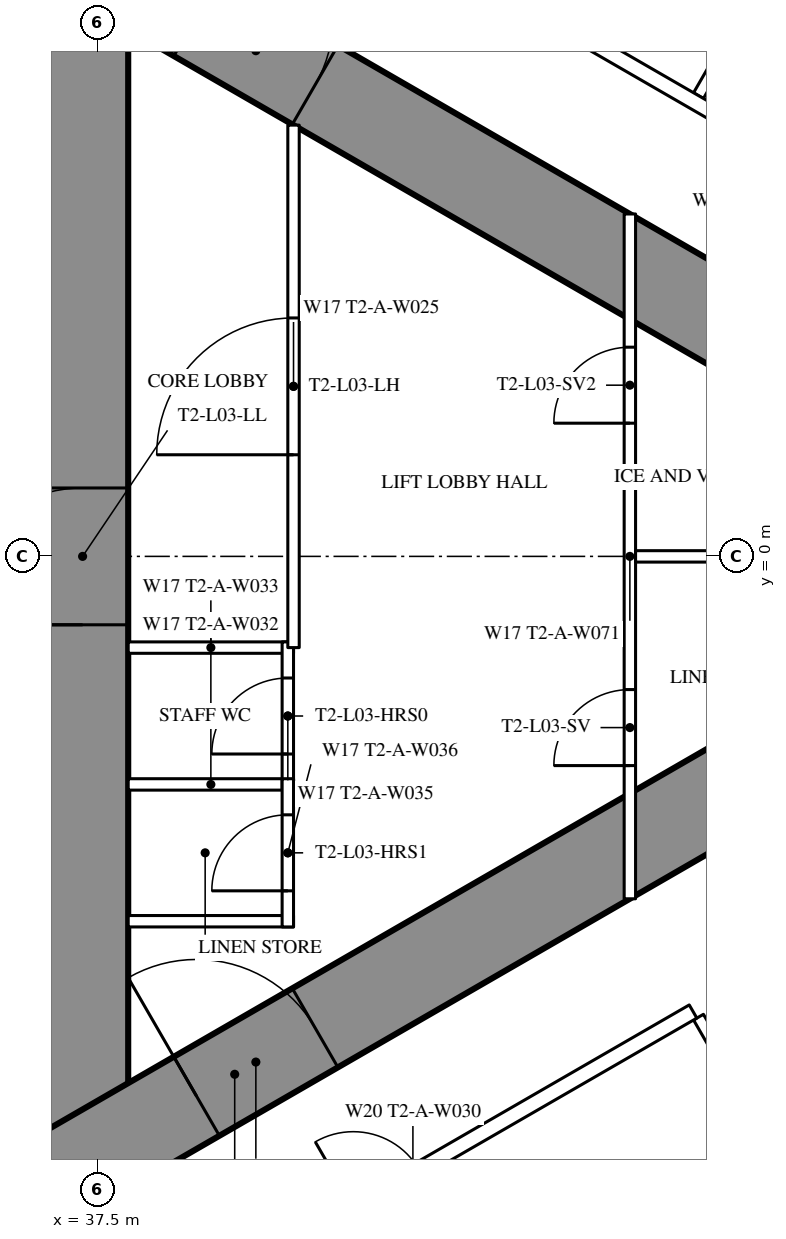
"""IFC4 building model, lengths in metres.
Left out: names, types, materials, properties, quantities, classifications, styles, units other than length and angle.
Written with IfcOpenShell. Run it as: python <this file> out.ifc"""

import sys

from ifc_helpers import new_model, si_unit, direction, frame, frame_2d, origin, place, context, subcontext, project, spatial, rectangle, extrude, element, fill, save


model = new_model("IFC4")
c1 = context("Model", 3, precision=1e-05, world=origin(), true_north=direction((0.0, 1.0)))
c2 = subcontext(c1, "Body", "Model", "MODEL_VIEW")
j1 = project(units=[si_unit("LENGTHUNIT", "METRE"), si_unit("PLANEANGLEUNIT", "RADIAN")], contexts=[c1])
p1 = place(None, origin())
s1 = spatial("IfcSite", under=j1, at=p1, CompositionType="ELEMENT")
p2 = place(p1, origin())
s2 = spatial("IfcBuilding", under=s1, at=p2, CompositionType="ELEMENT")
p3 = place(p2, frame((0.0, 0.0, 18.0)))
s3 = spatial("IfcBuildingStorey", under=s2, at=p3, CompositionType="ELEMENT", Elevation=18.0)
p4 = place(p3, frame((37.3, -8.6, 0.0), z_axis=(0.0, 0.0, 1.0), x_axis=(0.0, 1.0, 0.0)))
e1 = element("IfcWall", 1, at=p4, inside=s3, PredefinedType="SHEAR", context=c2, shape_type="SweptSolid", body=[
    extrude(rectangle(XDim=17.2, YDim=1.2, at=frame_2d((8.6, 0.0))), origin(), (0.0, 0.0, 1.0), 3.5),
])
p5 = place(p4, frame((7.7, 0.0, 0.0)))
e2 = element("IfcOpeningElement", 2, at=p5, cuts=e1, PredefinedType="OPENING", context=c2, shape_type="SweptSolid", body=[
    extrude(rectangle(XDim=1.8, YDim=2.2, at=frame_2d((0.9, 1.1))), frame((0.0, 0.61, 0.0), z_axis=(0.0, -1.0, 0.0), x_axis=(1.0, 0.0, 0.0)), (0.0, 0.0, 1.0), 1.22),
])
p6 = place(p3, frame((27.2, -13.8, 0.0), z_axis=(0.0, 0.0, 1.0), x_axis=(0.866027159892, 0.499996958321, 0.0)))
e3 = element("IfcWall", 3, at=p6, inside=s3, PredefinedType="SHEAR", context=c2, shape_type="SweptSolid", body=[
    extrude(rectangle(XDim=27.947, YDim=1.2, at=frame_2d((13.973, 0.0))), origin(), (0.0, 0.0, 1.0), 3.5),
])
p7 = place(p6, frame((4.6, 0.0, 0.0)))
e4 = element("IfcOpeningElement", 4, at=p7, cuts=e3, PredefinedType="OPENING", context=c2, shape_type="SweptSolid", body=[
    extrude(rectangle(XDim=1.0, YDim=2.2, at=frame_2d((0.5, 1.1))), frame((0.0, 0.61, 0.0), z_axis=(0.0, -1.0, 0.0), x_axis=(1.0, 0.0, 0.0)), (0.0, 0.0, 1.0), 1.22),
])
p8 = place(p6, frame((13.395, 0.0, 0.0)))
e5 = element("IfcOpeningElement", 5, at=p8, cuts=e3, PredefinedType="OPENING", context=c2, shape_type="SweptSolid", body=[
    extrude(rectangle(XDim=1.8, YDim=2.2, at=frame_2d((0.9, 1.1))), frame((0.0, 0.61, 0.0), z_axis=(0.0, -1.0, 0.0), x_axis=(1.0, 0.0, 0.0)), (0.0, 0.0, 1.0), 1.22),
])
p9 = place(p3, frame((27.2, 13.8, 0.0), z_axis=(0.0, 0.0, 1.0), x_axis=(0.866024515034, -0.500001539357, 0.0)))
e6 = element("IfcWall", 6, at=p9, inside=s3, PredefinedType="SHEAR", context=c2, shape_type="SweptSolid", body=[
    extrude(rectangle(XDim=26.907, YDim=1.2, at=frame_2d((13.454, 0.0))), origin(), (0.0, 0.0, 1.0), 3.5),
])
p10 = place(p9, frame((4.6, 0.0, 0.0)))
e7 = element("IfcOpeningElement", 7, at=p10, cuts=e6, PredefinedType="OPENING", context=c2, shape_type="SweptSolid", body=[
    extrude(rectangle(XDim=1.0, YDim=2.2, at=frame_2d((0.5, 1.1))), frame((0.0, 0.61, 0.0), z_axis=(0.0, -1.0, 0.0), x_axis=(1.0, 0.0, 0.0)), (0.0, 0.0, 1.0), 1.22),
])
p11 = place(p9, frame((13.395, 0.0, 0.0)))
e8 = element("IfcOpeningElement", 8, at=p11, cuts=e6, PredefinedType="OPENING", context=c2, shape_type="SweptSolid", body=[
    extrude(rectangle(XDim=1.8, YDim=2.2, at=frame_2d((0.9, 1.1))), frame((0.0, 0.61, 0.0), z_axis=(0.0, -1.0, 0.0), x_axis=(1.0, 0.0, 0.0)), (0.0, 0.0, 1.0), 1.22),
])
p12 = place(p3, frame((45.403, -6.062, 0.0), z_axis=(0.0, 0.0, 1.0), x_axis=(0.500007077968, -0.866021317279, 0.0)))
e9 = element("IfcWall", 9, at=p12, inside=s3, PredefinedType="PARTITIONING", context=c2, shape_type="SweptSolid", body=[
    extrude(rectangle(XDim=12.721, YDim=0.15, at=frame_2d((6.361, 0.0))), origin(), (0.0, 0.0, 1.0), 3.25),
])
p13 = place(p3, frame((45.403, 6.062, 0.0), z_axis=(0.0, 0.0, 1.0), x_axis=(0.500013434677, 0.866017647131, 0.0)))
e10 = element("IfcWall", 10, at=p13, inside=s3, PredefinedType="PARTITIONING", context=c2, shape_type="SweptSolid", body=[
    extrude(rectangle(XDim=9.902, YDim=0.15, at=frame_2d((4.951, 0.0))), origin(), (0.0, 0.0, 1.0), 2.25),
])
p14 = place(p3, frame((36.834, 10.894, 0.0), z_axis=(0.0, 0.0, 1.0), x_axis=(0.866028157229, -0.499995230863, 0.0)))
e11 = element("IfcWall", 11, at=p14, inside=s3, PredefinedType="PARTITIONING", context=c2, shape_type="SweptSolid", body=[
    extrude(rectangle(XDim=21.667, YDim=0.2, at=frame_2d((10.833, 0.0))), origin(), (0.0, 0.0, 1.0), 3.25),
])
p15 = place(p14, frame((18.885, 0.0, 0.0)))
e12 = element("IfcOpeningElement", 12, at=p15, cuts=e11, PredefinedType="OPENING", context=c2, shape_type="SweptSolid", body=[
    extrude(rectangle(XDim=0.95, YDim=2.2, at=frame_2d((0.475, 1.1))), frame((0.0, 0.11, 0.0), z_axis=(0.0, -1.0, 0.0), x_axis=(1.0, 0.0, 0.0)), (0.0, 0.0, 1.0), 0.22),
])
p16 = place(p14, frame((14.835, 0.0, 0.0)))
e13 = element("IfcOpeningElement", 13, at=p16, cuts=e11, PredefinedType="OPENING", context=c2, shape_type="SweptSolid", body=[
    extrude(rectangle(XDim=0.95, YDim=2.2, at=frame_2d((0.475, 1.1))), frame((0.0, 0.11, 0.0), z_axis=(0.0, -1.0, 0.0), x_axis=(1.0, 0.0, 0.0)), (0.0, 0.0, 1.0), 0.22),
])
p17 = place(p14, frame((12.85, 0.0, 0.0)))
e14 = element("IfcOpeningElement", 14, at=p17, cuts=e11, PredefinedType="OPENING", context=c2, shape_type="SweptSolid", body=[
    extrude(rectangle(XDim=0.95, YDim=2.2, at=frame_2d((0.475, 1.1))), frame((0.0, 0.11, 0.0), z_axis=(0.0, -1.0, 0.0), x_axis=(1.0, 0.0, 0.0)), (0.0, 0.0, 1.0), 0.22),
])
p18 = place(p14, frame((1.542, 0.0, 0.0)))
e15 = element("IfcOpeningElement", 15, at=p18, cuts=e11, PredefinedType="OPENING", context=c2, shape_type="SweptSolid", body=[
    extrude(rectangle(XDim=0.95, YDim=2.2, at=frame_2d((0.475, 1.1))), frame((0.0, 0.11, 0.0), z_axis=(0.0, -1.0, 0.0), x_axis=(1.0, 0.0, 0.0)), (0.0, 0.0, 1.0), 0.22),
])
p19 = place(p3, frame((37.96, -10.243, 0.0), z_axis=(0.0, 0.0, 1.0), x_axis=(0.866024617314, 0.500001362204, 0.0)))
e16 = element("IfcWall", 16, at=p19, inside=s3, PredefinedType="PARTITIONING", context=c2, shape_type="SweptSolid", body=[
    extrude(rectangle(XDim=8.512, YDim=0.2, at=frame_2d((4.256, 0.0))), origin(), (0.0, 0.0, 1.0), 3.25),
])
p20 = place(p19, frame((3.35, 0.0, 0.0)))
e17 = element("IfcOpeningElement", 17, at=p20, cuts=e16, PredefinedType="OPENING", context=c2, shape_type="SweptSolid", body=[
    extrude(rectangle(XDim=1.0, YDim=2.2, at=frame_2d((0.5, 1.1))), frame((0.0, 0.11, 0.0), z_axis=(0.0, -1.0, 0.0), x_axis=(1.0, 0.0, 0.0)), (0.0, 0.0, 1.0), 0.22),
])
for number, where, z_axis, x_axis in (
    (18, (37.9, -1.2, 0.0), (0.0, 0.0, 1.0), (1.0, 0.0, 0.0)),
    (19, (37.9, -3.0, 0.0), (0.0, 0.0, 1.0), (1.0, 0.0, 0.0)),
    (20, (37.9, -4.8, 0.0), (0.0, 0.0, 1.0), (1.0, 0.0, 0.0)),
):
    element("IfcWall", number, at=place(p3, frame(where, z_axis=z_axis, x_axis=x_axis)), inside=s3, PredefinedType="PARTITIONING", context=c2, shape_type="SweptSolid", body=[
        extrude(rectangle(XDim=2.175, YDim=0.15, at=frame_2d((1.087, 0.0))), origin(), (0.0, 0.0, 1.0), 3.25),
    ])
p21 = place(p3, frame((40.0, -3.075, 0.0), z_axis=(0.0, 0.0, 1.0), x_axis=(0.0, 1.0, 0.0)))
e21 = element("IfcWall", 21, at=p21, inside=s3, PredefinedType="PARTITIONING", context=c2, shape_type="SweptSolid", body=[
    extrude(rectangle(XDim=1.95, YDim=0.15, at=frame_2d((0.975, 0.0))), origin(), (0.0, 0.0, 1.0), 3.25),
])
p22 = place(p21, frame((0.475, 0.0, 0.0)))
e22 = element("IfcOpeningElement", 22, at=p22, cuts=e21, PredefinedType="OPENING", context=c2, shape_type="SweptSolid", body=[
    extrude(rectangle(XDim=1.0, YDim=2.2, at=frame_2d((0.5, 1.1))), frame((0.0, 0.085, 0.0), z_axis=(0.0, -1.0, 0.0), x_axis=(1.0, 0.0, 0.0)), (0.0, 0.0, 1.0), 0.17),
])
p23 = place(p3, frame((40.0, -4.875, 0.0), z_axis=(0.0, 0.0, 1.0), x_axis=(0.0, 1.0, 0.0)))
e23 = element("IfcWall", 23, at=p23, inside=s3, PredefinedType="PARTITIONING", context=c2, shape_type="SweptSolid", body=[
    extrude(rectangle(XDim=1.95, YDim=0.15, at=frame_2d((0.975, 0.0))), origin(), (0.0, 0.0, 1.0), 3.25),
])
p24 = place(p23, frame((0.475, 0.0, 0.0)))
e24 = element("IfcOpeningElement", 24, at=p24, cuts=e23, PredefinedType="OPENING", context=c2, shape_type="SweptSolid", body=[
    extrude(rectangle(XDim=1.0, YDim=2.2, at=frame_2d((0.5, 1.1))), frame((0.0, 0.085, 0.0), z_axis=(0.0, -1.0, 0.0), x_axis=(1.0, 0.0, 0.0)), (0.0, 0.0, 1.0), 0.17),
])
p25 = place(p3, frame((40.075, -1.2, 0.0), z_axis=(0.0, 0.0, 1.0), x_axis=(0.0, 1.0, 0.0)))
e25 = element("IfcWall", 25, at=p25, inside=s3, PredefinedType="PARTITIONING", context=c2, shape_type="SweptSolid", body=[
    extrude(rectangle(XDim=6.874, YDim=0.15, at=frame_2d((3.437, 0.0))), origin(), (0.0, 0.0, 1.0), 3.25),
])
p26 = place(p25, frame((2.537, 0.0, 0.0)))
e26 = element("IfcOpeningElement", 26, at=p26, cuts=e25, PredefinedType="OPENING", context=c2, shape_type="SweptSolid", body=[
    extrude(rectangle(XDim=1.8, YDim=2.2, at=frame_2d((0.9, 1.1))), frame((0.0, 0.085, 0.0), z_axis=(0.0, -1.0, 0.0), x_axis=(1.0, 0.0, 0.0)), (0.0, 0.0, 1.0), 0.17),
])
p27 = place(p3, frame((44.5, -4.505, 0.0), z_axis=(0.0, 0.0, 1.0), x_axis=(0.0, 1.0, 0.0)))
e27 = element("IfcWall", 27, at=p27, inside=s3, PredefinedType="PARTITIONING", context=c2, shape_type="SweptSolid", body=[
    extrude(rectangle(XDim=9.009, YDim=0.15, at=frame_2d((4.505, 0.0))), origin(), (0.0, 0.0, 1.0), 2.35),
])
p28 = place(p27, frame((1.752, 0.0, 0.0)))
e28 = element("IfcOpeningElement", 28, at=p28, cuts=e27, PredefinedType="OPENING", context=c2, shape_type="SweptSolid", body=[
    extrude(rectangle(XDim=1.0, YDim=2.2, at=frame_2d((0.5, 1.1))), frame((0.0, 0.085, 0.0), z_axis=(0.0, -1.0, 0.0), x_axis=(1.0, 0.0, 0.0)), (0.0, 0.0, 1.0), 0.17),
])
p29 = place(p27, frame((6.257, 0.0, 0.0)))
e29 = element("IfcOpeningElement", 29, at=p29, cuts=e27, PredefinedType="OPENING", context=c2, shape_type="SweptSolid", body=[
    extrude(rectangle(XDim=1.0, YDim=2.2, at=frame_2d((0.5, 1.1))), frame((0.0, 0.085, 0.0), z_axis=(0.0, -1.0, 0.0), x_axis=(1.0, 0.0, 0.0)), (0.0, 0.0, 1.0), 0.17),
])
p30 = place(p3, frame((44.575, 0.0, 0.0), z_axis=(0.0, 0.0, 1.0), x_axis=(1.0, 0.0, 0.0)))
e30 = element("IfcWall", 30, at=p30, inside=s3, PredefinedType="PARTITIONING", context=c2, shape_type="SweptSolid", body=[
    extrude(rectangle(XDim=7.727, YDim=0.15, at=frame_2d((3.864, 0.0))), origin(), (0.0, 0.0, 1.0), 2.25),
])
p31 = place(p22, origin())
e31 = element("IfcDoor", 31, at=p31, inside=s3, OperationType="SINGLE_SWING_LEFT", PredefinedType="DOOR", context=c2, shape_type="SweptSolid", body=[
    extrude(rectangle(XDim=1.0, YDim=2.2, at=frame_2d((0.5, 1.1))), frame((0.0, 0.025, 0.0), z_axis=(0.0, -1.0, 0.0), x_axis=(1.0, 0.0, 0.0)), (0.0, 0.0, 1.0), 0.05),
])
fill(e22, e31)
p32 = place(p24, origin())
e32 = element("IfcDoor", 32, at=p32, inside=s3, OperationType="SINGLE_SWING_LEFT", PredefinedType="DOOR", context=c2, shape_type="SweptSolid", body=[
    extrude(rectangle(XDim=1.0, YDim=2.2, at=frame_2d((0.5, 1.1))), frame((0.0, 0.025, 0.0), z_axis=(0.0, -1.0, 0.0), x_axis=(1.0, 0.0, 0.0)), (0.0, 0.0, 1.0), 0.05),
])
fill(e24, e32)
p33 = place(p26, origin())
e33 = element("IfcDoor", 33, at=p33, inside=s3, OperationType="DOUBLE_DOOR_SINGLE_SWING", PredefinedType="DOOR", context=c2, shape_type="SweptSolid", body=[
    extrude(rectangle(XDim=1.8, YDim=2.2, at=frame_2d((0.9, 1.1))), frame((0.0, 0.025, 0.0), z_axis=(0.0, -1.0, 0.0), x_axis=(1.0, 0.0, 0.0)), (0.0, 0.0, 1.0), 0.05),
])
fill(e26, e33)
p34 = place(p28, origin())
e34 = element("IfcDoor", 34, at=p34, inside=s3, OperationType="SINGLE_SWING_LEFT", PredefinedType="DOOR", context=c2, shape_type="SweptSolid", body=[
    extrude(rectangle(XDim=1.0, YDim=2.2, at=frame_2d((0.5, 1.1))), frame((0.0, 0.025, 0.0), z_axis=(0.0, -1.0, 0.0), x_axis=(1.0, 0.0, 0.0)), (0.0, 0.0, 1.0), 0.05),
])
fill(e28, e34)
p35 = place(p29, origin())
e35 = element("IfcDoor", 35, at=p35, inside=s3, OperationType="SINGLE_SWING_LEFT", PredefinedType="DOOR", context=c2, shape_type="SweptSolid", body=[
    extrude(rectangle(XDim=1.0, YDim=2.2, at=frame_2d((0.5, 1.1))), frame((0.0, 0.025, 0.0), z_axis=(0.0, -1.0, 0.0), x_axis=(1.0, 0.0, 0.0)), (0.0, 0.0, 1.0), 0.05),
])
fill(e29, e35)
p36 = place(p8, origin())
e36 = element("IfcDoor", 36, at=p36, inside=s3, OperationType="DOUBLE_DOOR_SINGLE_SWING", PredefinedType="DOOR", context=c2, shape_type="SweptSolid", body=[
    extrude(rectangle(XDim=1.8, YDim=2.2, at=frame_2d((0.9, 1.1))), frame((0.0, 0.025, 0.0), z_axis=(0.0, -1.0, 0.0), x_axis=(1.0, 0.0, 0.0)), (0.0, 0.0, 1.0), 0.05),
])
fill(e5, e36)
p37 = place(p11, origin())
e37 = element("IfcDoor", 37, at=p37, inside=s3, OperationType="DOUBLE_DOOR_SINGLE_SWING", PredefinedType="DOOR", context=c2, shape_type="SweptSolid", body=[
    extrude(rectangle(XDim=1.8, YDim=2.2, at=frame_2d((0.9, 1.1))), frame((0.0, 0.025, 0.0), z_axis=(0.0, -1.0, 0.0), x_axis=(1.0, 0.0, 0.0)), (0.0, 0.0, 1.0), 0.05),
])
fill(e8, e37)
p38 = place(p5, origin())
e38 = element("IfcDoor", 38, at=p38, inside=s3, OperationType="DOUBLE_DOOR_SINGLE_SWING", PredefinedType="DOOR", context=c2, shape_type="SweptSolid", body=[
    extrude(rectangle(XDim=1.8, YDim=2.2, at=frame_2d((0.9, 1.1))), frame((0.0, 0.025, 0.0), z_axis=(0.0, -1.0, 0.0), x_axis=(1.0, 0.0, 0.0)), (0.0, 0.0, 1.0), 0.05),
])
fill(e2, e38)
save(model, sys.argv[1])
